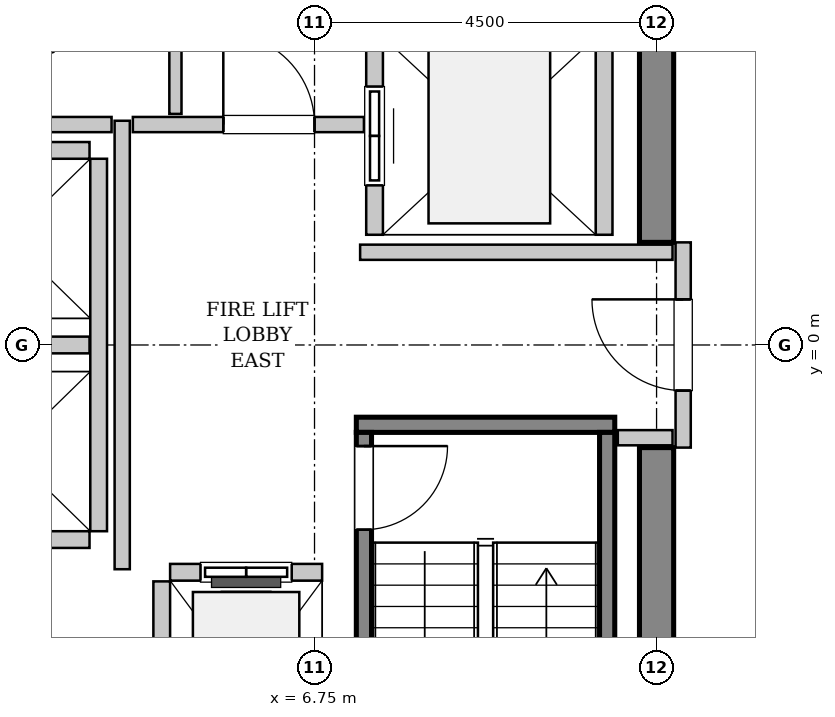
"""IFC4 building model, lengths in metres.
Left out: names, types, materials, properties, quantities, classifications, styles, units other than length and angle.
Written with IfcOpenShell. Run it as: python <this file> out.ifc"""

import sys

from ifc_helpers import new_model, si_unit, direction, frame, frame_2d, origin, place, context, subcontext, project, spatial, rectangle, extrude, source, transform, mapped, element, fill, save


model = new_model("IFC4")
c1 = context("Model", 3, precision=1e-05, world=origin(), true_north=direction((0.0, 1.0)))
c2 = subcontext(c1, "Body", "Model", "MODEL_VIEW")
j1 = project(units=[si_unit("LENGTHUNIT", "METRE"), si_unit("PLANEANGLEUNIT", "RADIAN")], contexts=[c1])
p1 = place(None, origin())
s1 = spatial("IfcSite", under=j1, at=p1, CompositionType="ELEMENT")
p2 = place(p1, origin())
s2 = spatial("IfcBuilding", under=s1, at=p2, CompositionType="ELEMENT")
p3 = place(p2, frame((0.0, 0.0, 279.8)))
s3 = spatial("IfcBuildingStorey", under=s2, at=p3, CompositionType="ELEMENT", Elevation=279.8)
m1 = source(origin(), c2, "Body", "SweptSolid", [
    extrude(rectangle(XDim=7.425, YDim=0.45, at=frame_2d((3.712, 0.0))), origin(), (0.0, 0.0, 1.0), 3.8),
])
for number, where, z_axis, x_axis in (
    (1, (11.25, -8.775, 0.0), (0.0, 0.0, 1.0), (0.0, 1.0, 0.0)),
    (2, (11.25, 1.35, 0.0), (0.0, 0.0, 1.0), (0.0, 1.0, 0.0)),
):
    element("IfcWall", number, at=place(p3, frame(where, z_axis=z_axis, x_axis=x_axis)), inside=s3, PredefinedType="SHEAR", context=c2, shape_type="MappedRepresentation", body=[
        mapped(m1, transform((0.0, 0.0, 0.0), x_axis=(1.0, 0.0, 0.0), y_axis=(0.0, 1.0, 0.0), z_axis=(0.0, 0.0, 1.0), scale=1.0)),
    ])
m2 = source(origin(), c2, "Body", "SweptSolid", [
    extrude(rectangle(XDim=3.4, YDim=0.2, at=frame_2d((1.7, 0.0))), origin(), (0.0, 0.0, 1.0), 3.8),
])
p4 = place(p3, frame((7.3, -1.05, 0.0), z_axis=(0.0, 0.0, 1.0), x_axis=(1.0, 0.0, 0.0)))
e3 = element("IfcWall", 3, at=p4, inside=s3, PredefinedType="SOLIDWALL", context=c2, shape_type="MappedRepresentation", body=[
    mapped(m2, transform((0.0, 0.0, 0.0), x_axis=(1.0, 0.0, 0.0), y_axis=(0.0, 1.0, 0.0), z_axis=(0.0, 0.0, 1.0), scale=1.0)),
])
m3 = source(origin(), c2, "Body", "SweptSolid", [
    extrude(rectangle(XDim=7.1, YDim=0.2, at=frame_2d((3.55, 0.0))), origin(), (0.0, 0.0, 1.0), 3.8),
])
p5 = place(p3, frame((7.4, -1.15, 0.0), z_axis=(0.0, 0.0, 1.0), x_axis=(0.0, -1.0, 0.0)))
e4 = element("IfcWall", 4, at=p5, inside=s3, PredefinedType="SOLIDWALL", context=c2, shape_type="MappedRepresentation", body=[
    mapped(m3, transform((0.0, 0.0, 0.0), x_axis=(1.0, 0.0, 0.0), y_axis=(0.0, 1.0, 0.0), z_axis=(0.0, 0.0, 1.0), scale=1.0)),
])
p6 = place(p5, frame((0.18, 0.0, 0.0)))
e5 = element("IfcOpeningElement", 5, at=p6, cuts=e4, PredefinedType="OPENING", context=c2, shape_type="SweptSolid", body=[
    extrude(rectangle(XDim=1.1, YDim=2.15, at=frame_2d((0.55, 1.075))), frame((0.0, 0.11, 0.0), z_axis=(0.0, -1.0, 0.0), x_axis=(1.0, 0.0, 0.0)), (0.0, 0.0, 1.0), 0.22),
])
p7 = place(p3, frame((10.6, -1.15, 0.0), z_axis=(0.0, 0.0, 1.0), x_axis=(0.0, -1.0, 0.0)))
e6 = element("IfcWall", 6, at=p7, inside=s3, PredefinedType="SOLIDWALL", context=c2, shape_type="MappedRepresentation", body=[
    mapped(m3, transform((0.0, 0.0, 0.0), x_axis=(1.0, 0.0, 0.0), y_axis=(0.0, 1.0, 0.0), z_axis=(0.0, 0.0, 1.0), scale=1.0)),
])
m4 = source(origin(), c2, "Body", "SweptSolid", [
    extrude(rectangle(XDim=2.0, YDim=0.22, at=frame_2d((1.0, 0.0))), origin(), (0.0, 0.0, 1.0), 3.535),
])
p8 = place(p3, frame((6.85, -2.99, 0.0), z_axis=(0.0, 0.0, 1.0), x_axis=(-1.0, 0.0, 0.0)))
e7 = element("IfcWall", 7, at=p8, inside=s3, PredefinedType="SOLIDWALL", context=c2, shape_type="MappedRepresentation", body=[
    mapped(m4, transform((0.0, 0.0, 0.0), x_axis=(1.0, 0.0, 0.0), y_axis=(0.0, 1.0, 0.0), z_axis=(0.0, 0.0, 1.0), scale=1.0)),
])
p9 = place(p8, frame((0.4, 0.0, 0.0)))
e8 = element("IfcOpeningElement", 8, at=p9, cuts=e7, PredefinedType="OPENING", context=c2, shape_type="SweptSolid", body=[
    extrude(rectangle(XDim=1.2, YDim=2.2, at=frame_2d((0.6, 1.1))), frame((0.0, 0.12, 0.0), z_axis=(0.0, -1.0, 0.0), x_axis=(1.0, 0.0, 0.0)), (0.0, 0.0, 1.0), 0.24),
])
m5 = source(origin(), c2, "Body", "SweptSolid", [
    extrude(rectangle(XDim=2.68, YDim=0.22, at=frame_2d((1.34, 0.0))), origin(), (0.0, 0.0, 1.0), 3.535),
])
p10 = place(p3, frame((4.74, -3.11, 0.0), z_axis=(0.0, 0.0, 1.0), x_axis=(0.0, -1.0, 0.0)))
e9 = element("IfcWall", 9, at=p10, inside=s3, PredefinedType="SOLIDWALL", context=c2, shape_type="MappedRepresentation", body=[
    mapped(m5, transform((0.0, 0.0, 0.0), x_axis=(1.0, 0.0, 0.0), y_axis=(0.0, 1.0, 0.0), z_axis=(0.0, 0.0, 1.0), scale=1.0)),
])
m6 = source(origin(), c2, "Body", "SweptSolid", [
    extrude(rectangle(XDim=5.45, YDim=0.22, at=frame_2d((2.725, 0.0))), origin(), (0.0, 0.0, 1.0), 3.535),
])
p11 = place(p3, frame((7.54, 6.9, 0.0), z_axis=(0.0, 0.0, 1.0), x_axis=(0.0, -1.0, 0.0)))
e10 = element("IfcWall", 10, at=p11, inside=s3, PredefinedType="SOLIDWALL", context=c2, shape_type="MappedRepresentation", body=[
    mapped(m6, transform((0.0, 0.0, 0.0), x_axis=(1.0, 0.0, 0.0), y_axis=(0.0, 1.0, 0.0), z_axis=(0.0, 0.0, 1.0), scale=1.0)),
])
p12 = place(p11, frame((3.5, 0.0, 0.0)))
e11 = element("IfcOpeningElement", 11, at=p12, cuts=e10, PredefinedType="OPENING", context=c2, shape_type="SweptSolid", body=[
    extrude(rectangle(XDim=1.3, YDim=2.3, at=frame_2d((0.65, 1.15))), frame((0.0, 0.12, 0.0), z_axis=(0.0, -1.0, 0.0), x_axis=(1.0, 0.0, 0.0)), (0.0, 0.0, 1.0), 0.24),
])
p13 = place(p11, frame((0.65, 0.0, 0.0)))
e12 = element("IfcOpeningElement", 12, at=p13, cuts=e10, PredefinedType="OPENING", context=c2, shape_type="SweptSolid", body=[
    extrude(rectangle(XDim=1.3, YDim=2.3, at=frame_2d((0.65, 1.15))), frame((0.0, 0.12, 0.0), z_axis=(0.0, -1.0, 0.0), x_axis=(1.0, 0.0, 0.0)), (0.0, 0.0, 1.0), 0.24),
])
p14 = place(p3, frame((10.56, 1.45, 0.0), z_axis=(0.0, 0.0, 1.0), x_axis=(0.0, 1.0, 0.0)))
e13 = element("IfcWall", 13, at=p14, inside=s3, PredefinedType="SOLIDWALL", context=c2, shape_type="MappedRepresentation", body=[
    mapped(m6, transform((0.0, 0.0, 0.0), x_axis=(1.0, 0.0, 0.0), y_axis=(0.0, 1.0, 0.0), z_axis=(0.0, 0.0, 1.0), scale=1.0)),
])
m7 = source(origin(), c2, "Body", "SweptSolid", [
    extrude(rectangle(XDim=4.9, YDim=0.22, at=frame_2d((2.45, 0.0))), origin(), (0.0, 0.0, 1.0), 3.535),
])
p15 = place(p3, frame((3.91, -2.45, 0.0), z_axis=(0.0, 0.0, 1.0), x_axis=(0.0, 1.0, 0.0)))
e14 = element("IfcWall", 14, at=p15, inside=s3, PredefinedType="SOLIDWALL", context=c2, shape_type="MappedRepresentation", body=[
    mapped(m7, transform((0.0, 0.0, 0.0), x_axis=(1.0, 0.0, 0.0), y_axis=(0.0, 1.0, 0.0), z_axis=(0.0, 0.0, 1.0), scale=1.0)),
])
m8 = source(origin(), c2, "Body", "SweptSolid", [
    extrude(rectangle(XDim=2.13, YDim=0.22, at=frame_2d((1.065, 0.0))), origin(), (0.0, 0.0, 1.0), 3.535),
])
for number, where, z_axis, x_axis in (
    (15, (1.66, -2.56, 0.0), (0.0, 0.0, 1.0), (1.0, 0.0, 0.0)),
    (16, (1.66, 0.0, 0.0), (0.0, 0.0, 1.0), (1.0, 0.0, 0.0)),
    (17, (3.79, 2.56, 0.0), (0.0, 0.0, 1.0), (-1.0, 0.0, 0.0)),
):
    element("IfcWall", number, at=place(p3, frame(where, z_axis=z_axis, x_axis=x_axis)), inside=s3, PredefinedType="SOLIDWALL", context=c2, shape_type="MappedRepresentation", body=[
        mapped(m8, transform((0.0, 0.0, 0.0), x_axis=(1.0, 0.0, 0.0), y_axis=(0.0, 1.0, 0.0), z_axis=(0.0, 0.0, 1.0), scale=1.0)),
    ])
m9 = source(origin(), c2, "Body", "SweptSolid", [
    extrude(rectangle(XDim=2.7, YDim=0.2, at=frame_2d((1.35, 0.0))), origin(), (0.0, 0.0, 1.0), 2.625),
])
p16 = place(p3, frame((11.6, -1.35, 0.0), z_axis=(0.0, 0.0, 1.0), x_axis=(0.0, 1.0, 0.0)))
e18 = element("IfcWall", 18, at=p16, inside=s3, PredefinedType="PARTITIONING", context=c2, shape_type="MappedRepresentation", body=[
    mapped(m9, transform((0.0, 0.0, 0.0), x_axis=(1.0, 0.0, 0.0), y_axis=(0.0, 1.0, 0.0), z_axis=(0.0, 0.0, 1.0), scale=1.0)),
])
p17 = place(p16, frame((0.75, 0.0, 0.0)))
e19 = element("IfcOpeningElement", 19, at=p17, cuts=e18, PredefinedType="OPENING", context=c2, shape_type="SweptSolid", body=[
    extrude(rectangle(XDim=1.2, YDim=2.15, at=frame_2d((0.6, 1.075))), frame((0.0, 0.11, 0.0), z_axis=(0.0, -1.0, 0.0), x_axis=(1.0, 0.0, 0.0)), (0.0, 0.0, 1.0), 0.22),
])
m10 = source(origin(), c2, "Body", "SweptSolid", [
    extrude(rectangle(XDim=5.9, YDim=0.2, at=frame_2d((2.95, 0.0))), origin(), (0.0, 0.0, 1.0), 3.535),
])
p18 = place(p3, frame((4.22, -2.95, 0.0), z_axis=(0.0, 0.0, 1.0), x_axis=(0.0, 1.0, 0.0)))
e20 = element("IfcWall", 20, at=p18, inside=s3, PredefinedType="PARTITIONING", context=c2, shape_type="MappedRepresentation", body=[
    mapped(m10, transform((0.0, 0.0, 0.0), x_axis=(1.0, 0.0, 0.0), y_axis=(0.0, 1.0, 0.0), z_axis=(0.0, 0.0, 1.0), scale=1.0)),
])
m11 = source(origin(), c2, "Body", "SweptSolid", [
    extrude(rectangle(XDim=2.52, YDim=0.2, at=frame_2d((1.26, 0.0))), origin(), (0.0, 0.0, 1.0), 3.535),
])
p19 = place(p3, frame((1.56, 2.9, 0.0), z_axis=(0.0, 0.0, 1.0), x_axis=(1.0, 0.0, 0.0)))
e21 = element("IfcWall", 21, at=p19, inside=s3, PredefinedType="PARTITIONING", context=c2, shape_type="MappedRepresentation", body=[
    mapped(m11, transform((0.0, 0.0, 0.0), x_axis=(1.0, 0.0, 0.0), y_axis=(0.0, 1.0, 0.0), z_axis=(0.0, 0.0, 1.0), scale=1.0)),
])
m12 = source(origin(), c2, "Body", "SweptSolid", [
    extrude(rectangle(XDim=3.04, YDim=0.2, at=frame_2d((1.52, 0.0))), origin(), (0.0, 0.0, 1.0), 3.535),
])
p20 = place(p3, frame((4.36, 2.9, 0.0), z_axis=(0.0, 0.0, 1.0), x_axis=(1.0, 0.0, 0.0)))
e22 = element("IfcWall", 22, at=p20, inside=s3, PredefinedType="PARTITIONING", context=c2, shape_type="MappedRepresentation", body=[
    mapped(m12, transform((0.0, 0.0, 0.0), x_axis=(1.0, 0.0, 0.0), y_axis=(0.0, 1.0, 0.0), z_axis=(0.0, 0.0, 1.0), scale=1.0)),
])
p21 = place(p20, frame((1.19, 0.0, 0.0)))
e23 = element("IfcOpeningElement", 23, at=p21, cuts=e22, PredefinedType="OPENING", context=c2, shape_type="SweptSolid", body=[
    extrude(rectangle(XDim=1.2, YDim=2.15, at=frame_2d((0.6, 1.075))), frame((0.0, 0.11, 0.0), z_axis=(0.0, -1.0, 0.0), x_axis=(1.0, 0.0, 0.0)), (0.0, 0.0, 1.0), 0.22),
])
m13 = source(origin(), c2, "Body", "SweptSolid", [
    extrude(rectangle(XDim=4.11, YDim=0.2, at=frame_2d((2.055, 0.0))), origin(), (0.0, 0.0, 1.0), 3.535),
])
p22 = place(p3, frame((7.35, 1.22, 0.0), z_axis=(0.0, 0.0, 1.0), x_axis=(1.0, 0.0, 0.0)))
e24 = element("IfcWall", 24, at=p22, inside=s3, PredefinedType="PARTITIONING", context=c2, shape_type="MappedRepresentation", body=[
    mapped(m13, transform((0.0, 0.0, 0.0), x_axis=(1.0, 0.0, 0.0), y_axis=(0.0, 1.0, 0.0), z_axis=(0.0, 0.0, 1.0), scale=1.0)),
])
m14 = source(origin(), c2, "Body", "SweptSolid", [
    extrude(rectangle(XDim=0.72, YDim=0.2, at=frame_2d((0.36, 0.0))), origin(), (0.0, 0.0, 1.0), 3.535),
])
p23 = place(p3, frame((10.74, -1.22, 0.0), z_axis=(0.0, 0.0, 1.0), x_axis=(1.0, 0.0, 0.0)))
e25 = element("IfcWall", 25, at=p23, inside=s3, PredefinedType="PARTITIONING", context=c2, shape_type="MappedRepresentation", body=[
    mapped(m14, transform((0.0, 0.0, 0.0), x_axis=(1.0, 0.0, 0.0), y_axis=(0.0, 1.0, 0.0), z_axis=(0.0, 0.0, 1.0), scale=1.0)),
])
m15 = source(origin(), c2, "Body", "SweptSolid", [
    extrude(rectangle(XDim=5.45, YDim=0.16, at=frame_2d((2.725, 0.0))), origin(), (0.0, 0.0, 1.0), 3.535),
])
p24 = place(p3, frame((4.92, 3.04, 0.0), z_axis=(0.0, 0.0, 1.0), x_axis=(0.0, 1.0, 0.0)))
e26 = element("IfcWall", 26, at=p24, inside=s3, PredefinedType="PARTITIONING", context=c2, shape_type="MappedRepresentation", body=[
    mapped(m15, transform((0.0, 0.0, 0.0), x_axis=(1.0, 0.0, 0.0), y_axis=(0.0, 1.0, 0.0), z_axis=(0.0, 0.0, 1.0), scale=1.0)),
])
m16 = source(origin(), c2, "Body", "SweptSolid", [
    extrude(rectangle(XDim=1.1, YDim=2.15, at=frame_2d((0.55, 1.075))), frame((0.0, 0.025, 0.0), z_axis=(0.0, -1.0, 0.0), x_axis=(1.0, 0.0, 0.0)), (0.0, 0.0, 1.0), 0.05),
])
p25 = place(p6, origin())
e27 = element("IfcDoor", 27, at=p25, inside=s3, OperationType="SINGLE_SWING_LEFT", PredefinedType="DOOR", context=c2, shape_type="MappedRepresentation", body=[
    mapped(m16, transform((0.0, 0.0, 0.0), x_axis=(1.0, 0.0, 0.0), y_axis=(0.0, 1.0, 0.0), z_axis=(0.0, 0.0, 1.0), scale=1.0)),
])
fill(e5, e27)
m17 = source(origin(), c2, "Body", "SweptSolid", [
    extrude(rectangle(XDim=1.2, YDim=2.2, at=frame_2d((0.6, 1.1))), frame((0.0, 0.025, 0.0), z_axis=(0.0, -1.0, 0.0), x_axis=(1.0, 0.0, 0.0)), (0.0, 0.0, 1.0), 0.05),
])
p26 = place(p9, origin())
e28 = element("IfcDoor", 28, at=p26, inside=s3, OperationType="SLIDING_TO_LEFT", PredefinedType="DOOR", context=c2, shape_type="MappedRepresentation", body=[
    mapped(m17, transform((0.0, 0.0, 0.0), x_axis=(1.0, 0.0, 0.0), y_axis=(0.0, 1.0, 0.0), z_axis=(0.0, 0.0, 1.0), scale=1.0)),
])
fill(e8, e28)
m18 = source(origin(), c2, "Body", "SweptSolid", [
    extrude(rectangle(XDim=1.3, YDim=2.3, at=frame_2d((0.65, 1.15))), frame((0.0, 0.025, 0.0), z_axis=(0.0, -1.0, 0.0), x_axis=(1.0, 0.0, 0.0)), (0.0, 0.0, 1.0), 0.05),
])
p27 = place(p12, origin())
e29 = element("IfcDoor", 29, at=p27, inside=s3, OperationType="SLIDING_TO_RIGHT", PredefinedType="DOOR", context=c2, shape_type="MappedRepresentation", body=[
    mapped(m18, transform((0.0, 0.0, 0.0), x_axis=(1.0, 0.0, 0.0), y_axis=(0.0, 1.0, 0.0), z_axis=(0.0, 0.0, 1.0), scale=1.0)),
])
fill(e11, e29)
m19 = source(origin(), c2, "Body", "SweptSolid", [
    extrude(rectangle(XDim=1.2, YDim=2.15, at=frame_2d((0.6, 1.075))), frame((0.0, 0.025, 0.0), z_axis=(0.0, -1.0, 0.0), x_axis=(1.0, 0.0, 0.0)), (0.0, 0.0, 1.0), 0.05),
])
p28 = place(p17, origin())
e30 = element("IfcDoor", 30, at=p28, inside=s3, OperationType="SINGLE_SWING_RIGHT", PredefinedType="DOOR", context=c2, shape_type="MappedRepresentation", body=[
    mapped(m19, transform((0.0, 0.0, 0.0), x_axis=(1.0, 0.0, 0.0), y_axis=(0.0, 1.0, 0.0), z_axis=(0.0, 0.0, 1.0), scale=1.0)),
])
fill(e19, e30)
p29 = place(p21, origin())
e31 = element("IfcDoor", 31, at=p29, inside=s3, OperationType="SINGLE_SWING_LEFT", PredefinedType="DOOR", context=c2, shape_type="MappedRepresentation", body=[
    mapped(m19, transform((0.0, 0.0, 0.0), x_axis=(1.0, 0.0, 0.0), y_axis=(0.0, 1.0, 0.0), z_axis=(0.0, 0.0, 1.0), scale=1.0)),
])
fill(e23, e31)
save(model, sys.argv[1])
